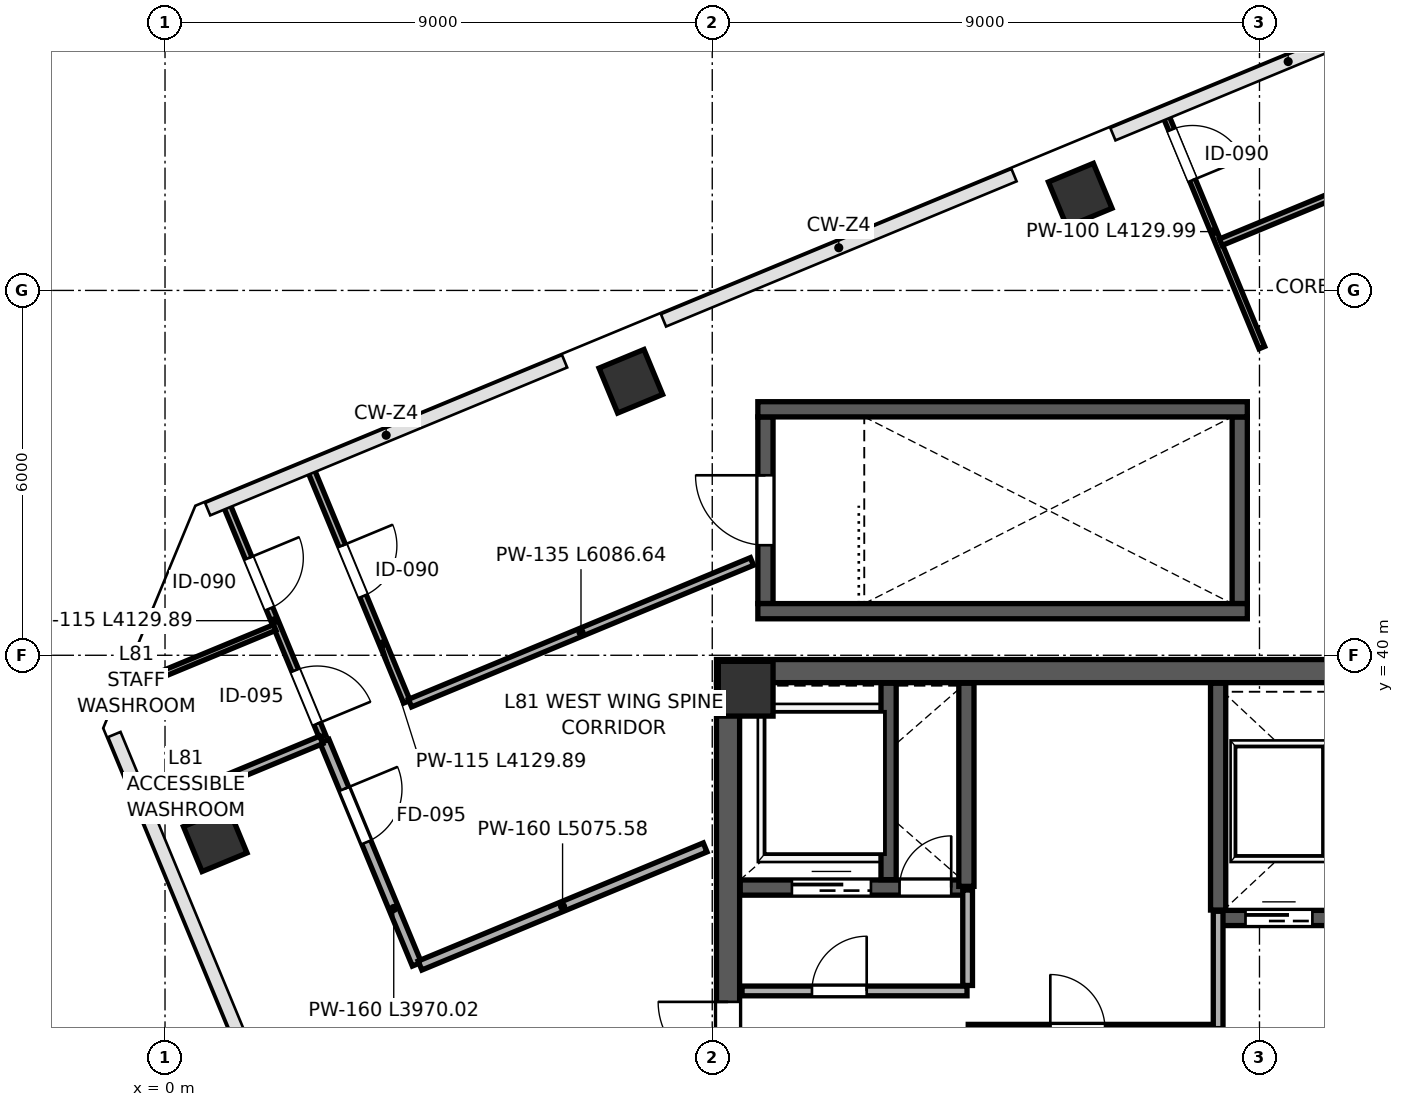
"""IFC4 building model, lengths in metres.
Left out: names, types, materials, properties, quantities, classifications, styles, units other than length and angle.
Written with IfcOpenShell. Run it as: python <this file> out.ifc"""

import sys

from ifc_helpers import new_model, si_unit, direction, frame, frame_2d, origin, origin_2d, place, context, subcontext, project, spatial, rectangle, extrude, source, transform, mapped, element, fill, save


model = new_model("IFC4")
c1 = context("Model", 3, precision=1e-05, world=origin(), true_north=direction((0.0, 1.0)))
c2 = subcontext(c1, "Body", "Model", "MODEL_VIEW")
j1 = project(units=[si_unit("LENGTHUNIT", "METRE"), si_unit("PLANEANGLEUNIT", "RADIAN")], contexts=[c1])
p1 = place(None, origin())
s1 = spatial("IfcSite", under=j1, at=p1, CompositionType="ELEMENT")
p2 = place(p1, origin())
s2 = spatial("IfcBuilding", under=s1, at=p2, CompositionType="ELEMENT")
p3 = place(p2, frame((0.0, 0.0, 360.0)))
s3 = spatial("IfcBuildingStorey", under=s2, at=p3, CompositionType="ELEMENT", Elevation=360.0)
m1 = source(origin(), c2, "Body", "SweptSolid", [
    extrude(rectangle(XDim=0.9, YDim=0.9, at=origin_2d()), origin(), (0.0, 0.0, 1.0), 5.999),
])
p4 = place(p3, frame((9.55, 39.45, 0.001), z_axis=(0.0, 0.0, 1.0), x_axis=(1.0, 0.0, 0.0)))
e1 = element("IfcColumn", 1, at=p4, inside=s3, PredefinedType="COLUMN", context=c2, shape_type="MappedRepresentation", body=[
    mapped(m1, transform((0.0, 0.0, 0.0), scale=1.0)),
])
m2 = source(origin(), c2, "Body", "SweptSolid", [
    extrude(rectangle(XDim=0.8, YDim=0.8, at=origin_2d()), origin(), (0.0, 0.0, 1.0), 5.699),
])
for number, where, z_axis, x_axis in (
    (2, (0.826, 36.966, 0.001), (0.0, 0.0, 1.0), (-0.383, 0.924, 0.0)),
    (3, (7.661, 44.506, 0.001), (0.0, 0.0, 1.0), (-0.383, 0.924, 0.0)),
    (4, (15.052, 47.567, 0.001), (0.0, 0.0, 1.0), (-0.383, 0.924, 0.0)),
):
    element("IfcColumn", number, at=place(p3, frame(where, z_axis=z_axis, x_axis=x_axis)), inside=s3, PredefinedType="COLUMN", context=c2, shape_type="MappedRepresentation", body=[
        mapped(m2, transform((0.0, 0.0, 0.0), scale=1.0)),
    ])
p5 = place(p3, frame((9.26, 24.45, 0.0), z_axis=(0.0, 0.0, 1.0), x_axis=(0.0, 1.0, 0.0)))
e5 = element("IfcWall", 5, at=p5, inside=s3, PredefinedType="SHEAR", context=c2, shape_type="SweptSolid", body=[
    extrude(rectangle(XDim=15.1, YDim=0.38, at=frame_2d((7.55, 0.0))), origin(), (0.0, 0.0, 1.0), 5.72),
])
p6 = place(p5, frame((8.7, 0.0, 0.0)))
e6 = element("IfcOpeningElement", 6, at=p6, cuts=e5, PredefinedType="OPENING", context=c2, shape_type="SweptSolid", body=[
    extrude(rectangle(XDim=1.15, YDim=2.2, at=frame_2d((0.575, 1.1))), frame((0.0, 0.2, 0.0), z_axis=(0.0, -1.0, 0.0), x_axis=(1.0, 0.0, 0.0)), (0.0, 0.0, 1.0), 0.4),
])
p7 = place(p3, frame((9.07, 39.74, 0.0), z_axis=(0.0, 0.0, 1.0), x_axis=(1.0, 0.0, 0.0)))
e7 = element("IfcWall", 7, at=p7, inside=s3, PredefinedType="SHEAR", context=c2, shape_type="SweptSolid", body=[
    extrude(rectangle(XDim=17.86, YDim=0.38, at=frame_2d((8.93, 0.0))), origin(), (0.0, 0.0, 1.0), 5.72),
])
p8 = place(p3, frame((9.46, 36.18, 0.0), z_axis=(0.0, 0.0, 1.0), x_axis=(1.0, 0.0, 0.0)))
e8 = element("IfcWall", 8, at=p8, inside=s3, PredefinedType="SHEAR", context=c2, shape_type="SweptSolid", body=[
    extrude(rectangle(XDim=3.79, YDim=0.25, at=frame_2d((1.895, 0.0))), origin(), (0.0, 0.0, 1.0), 5.72),
])
p9 = place(p8, frame((2.62, 0.0, 0.0)))
e9 = element("IfcOpeningElement", 9, at=p9, cuts=e8, PredefinedType="OPENING", context=c2, shape_type="SweptSolid", body=[
    extrude(rectangle(XDim=0.85, YDim=2.1, at=frame_2d((0.425, 1.05))), frame((0.0, 0.135, 0.0), z_axis=(0.0, -1.0, 0.0), x_axis=(1.0, 0.0, 0.0)), (0.0, 0.0, 1.0), 0.27),
])
p10 = place(p8, frame((0.85, 0.0, 0.0)))
e10 = element("IfcOpeningElement", 10, at=p10, cuts=e8, PredefinedType="OPENING", context=c2, shape_type="SweptSolid", body=[
    extrude(rectangle(XDim=1.3, YDim=2.25, at=frame_2d((0.65, 1.125))), frame((0.0, 0.135, 0.0), z_axis=(0.0, -1.0, 0.0), x_axis=(1.0, 0.0, 0.0)), (0.0, 0.0, 1.0), 0.27),
])
p11 = place(p3, frame((11.9, 36.31, 0.0), z_axis=(0.0, 0.0, 1.0), x_axis=(0.0, 1.0, 0.0)))
e11 = element("IfcWall", 11, at=p11, inside=s3, PredefinedType="SHEAR", context=c2, shape_type="SweptSolid", body=[
    extrude(rectangle(XDim=3.23, YDim=0.25, at=frame_2d((1.615, 0.0))), origin(), (0.0, 0.0, 1.0), 5.72),
])
p12 = place(p3, frame((13.18, 36.2, 0.0), z_axis=(0.0, 0.0, 1.0), x_axis=(0.0, 1.0, 0.0)))
e12 = element("IfcWall", 12, at=p12, inside=s3, PredefinedType="SHEAR", context=c2, shape_type="SweptSolid", body=[
    extrude(rectangle(XDim=3.34, YDim=0.25, at=frame_2d((1.67, 0.0))), origin(), (0.0, 0.0, 1.0), 5.72),
])
p13 = place(p3, frame((17.32, 35.68, 0.0), z_axis=(0.0, 0.0, 1.0), x_axis=(1.0, 0.0, 0.0)))
e13 = element("IfcWall", 13, at=p13, inside=s3, PredefinedType="SHEAR", context=c2, shape_type="SweptSolid", body=[
    extrude(rectangle(XDim=3.87, YDim=0.25, at=frame_2d((1.935, 0.0))), origin(), (0.0, 0.0, 1.0), 5.72),
])
p14 = place(p13, frame((0.45, 0.0, 0.0)))
e14 = element("IfcOpeningElement", 14, at=p14, cuts=e13, PredefinedType="OPENING", context=c2, shape_type="SweptSolid", body=[
    extrude(rectangle(XDim=1.1, YDim=2.2, at=frame_2d((0.55, 1.1))), frame((0.0, 0.135, 0.0), z_axis=(0.0, -1.0, 0.0), x_axis=(1.0, 0.0, 0.0)), (0.0, 0.0, 1.0), 0.27),
])
p15 = place(p13, frame((2.35, 0.0, 0.0)))
e15 = element("IfcOpeningElement", 15, at=p15, cuts=e13, PredefinedType="OPENING", context=c2, shape_type="SweptSolid", body=[
    extrude(rectangle(XDim=1.1, YDim=2.2, at=frame_2d((0.55, 1.1))), frame((0.0, 0.135, 0.0), z_axis=(0.0, -1.0, 0.0), x_axis=(1.0, 0.0, 0.0)), (0.0, 0.0, 1.0), 0.27),
])
p16 = place(p3, frame((17.32, 35.81, 0.0), z_axis=(0.0, 0.0, 1.0), x_axis=(0.0, 1.0, 0.0)))
e16 = element("IfcWall", 16, at=p16, inside=s3, PredefinedType="SHEAR", context=c2, shape_type="SweptSolid", body=[
    extrude(rectangle(XDim=3.73, YDim=0.25, at=frame_2d((1.865, 0.0))), origin(), (0.0, 0.0, 1.0), 5.72),
])
p17 = place(p3, frame((9.875, 40.85, 0.0), z_axis=(0.0, 0.0, 1.0), x_axis=(0.0, 1.0, 0.0)))
e17 = element("IfcWall", 17, at=p17, inside=s3, PredefinedType="SHEAR", context=c2, shape_type="SweptSolid", body=[
    extrude(rectangle(XDim=3.07, YDim=0.25, at=frame_2d((1.535, 0.0))), origin(), (0.0, 0.0, 1.0), 5.72),
])
p18 = place(p17, frame((0.96, 0.0, 0.0)))
e18 = element("IfcOpeningElement", 18, at=p18, cuts=e17, PredefinedType="OPENING", context=c2, shape_type="SweptSolid", body=[
    extrude(rectangle(XDim=1.15, YDim=2.2, at=frame_2d((0.575, 1.1))), frame((0.0, 0.135, 0.0), z_axis=(0.0, -1.0, 0.0), x_axis=(1.0, 0.0, 0.0)), (0.0, 0.0, 1.0), 0.27),
])
p19 = place(p3, frame((17.675, 40.85, 0.0), z_axis=(0.0, 0.0, 1.0), x_axis=(0.0, 1.0, 0.0)))
e19 = element("IfcWall", 19, at=p19, inside=s3, PredefinedType="SHEAR", context=c2, shape_type="SweptSolid", body=[
    extrude(rectangle(XDim=3.07, YDim=0.25, at=frame_2d((1.535, 0.0))), origin(), (0.0, 0.0, 1.0), 5.72),
])
for number, where, z_axis, x_axis in (
    (20, (9.75, 40.725, 0.0), (0.0, 0.0, 1.0), (1.0, 0.0, 0.0)),
    (21, (9.75, 44.045, 0.0), (0.0, 0.0, 1.0), (1.0, 0.0, 0.0)),
):
    element("IfcWall", number, at=place(p3, frame(where, z_axis=z_axis, x_axis=x_axis)), inside=s3, PredefinedType="SHEAR", context=c2, shape_type="SweptSolid", body=[
        extrude(rectangle(XDim=8.05, YDim=0.25, at=frame_2d((4.025, 0.0))), origin(), (0.0, 0.0, 1.0), 5.72),
    ])
p20 = place(p3, frame((9.49, 34.48, 0.0), z_axis=(0.0, 0.0, 1.0), x_axis=(1.0, 0.0, 0.0)))
e22 = element("IfcWall", 22, at=p20, inside=s3, PredefinedType="PARTITIONING", context=c2, shape_type="SweptSolid", body=[
    extrude(rectangle(XDim=3.7, YDim=0.16, at=frame_2d((1.85, 0.0))), origin(), (0.0, 0.0, 1.0), 5.72),
])
p21 = place(p20, frame((1.15, 0.0, 0.0)))
e23 = element("IfcOpeningElement", 23, at=p21, cuts=e22, PredefinedType="OPENING", context=c2, shape_type="SweptSolid", body=[
    extrude(rectangle(XDim=0.9, YDim=2.15, at=frame_2d((0.45, 1.075))), frame((0.0, 0.09, 0.0), z_axis=(0.0, -1.0, 0.0), x_axis=(1.0, 0.0, 0.0)), (0.0, 0.0, 1.0), 0.18),
])
p22 = place(p3, frame((13.2, 34.57, 0.0), z_axis=(0.0, 0.0, 1.0), x_axis=(0.0, 1.0, 0.0)))
e24 = element("IfcWall", 24, at=p22, inside=s3, PredefinedType="PARTITIONING", context=c2, shape_type="SweptSolid", body=[
    extrude(rectangle(XDim=1.57, YDim=0.16, at=frame_2d((0.785, 0.0))), origin(), (0.0, 0.0, 1.0), 5.72),
])
p23 = place(p3, frame((13.21, 33.85, 0.0), z_axis=(0.0, 0.0, 1.0), x_axis=(1.0, 0.0, 0.0)))
e25 = element("IfcWall", 25, at=p23, inside=s3, PredefinedType="PARTITIONING", context=c2, shape_type="SweptSolid", body=[
    extrude(rectangle(XDim=4.1, YDim=0.16, at=frame_2d((2.05, 0.0))), origin(), (0.0, 0.0, 1.0), 5.72),
])
p24 = place(p23, frame((1.35, 0.0, 0.0)))
e26 = element("IfcOpeningElement", 26, at=p24, cuts=e25, PredefinedType="OPENING", context=c2, shape_type="SweptSolid", body=[
    extrude(rectangle(XDim=0.9, YDim=2.15, at=frame_2d((0.45, 1.075))), frame((0.0, 0.09, 0.0), z_axis=(0.0, -1.0, 0.0), x_axis=(1.0, 0.0, 0.0)), (0.0, 0.0, 1.0), 0.18),
])
p25 = place(p3, frame((17.32, 33.86, 0.0), z_axis=(0.0, 0.0, 1.0), x_axis=(0.0, 1.0, 0.0)))
e27 = element("IfcWall", 27, at=p25, inside=s3, PredefinedType="PARTITIONING", context=c2, shape_type="SweptSolid", body=[
    extrude(rectangle(XDim=1.93, YDim=0.16, at=frame_2d((0.965, 0.0))), origin(), (0.0, 0.0, 1.0), 5.72),
])
p26 = place(p3, frame((1.011, 42.477, 0.0), z_axis=(0.0, 0.0, 1.0), x_axis=(0.382696360839, -0.923874177256, 0.0)))
e28 = element("IfcWall", 28, at=p26, inside=s3, PredefinedType="PARTITIONING", context=c2, shape_type="SweptSolid", body=[
    extrude(rectangle(XDim=4.13, YDim=0.115, at=frame_2d((2.065, 0.0))), origin(), (0.0, 0.0, 1.0), 5.72),
])
p27 = place(p26, frame((0.95, 0.0, 0.0)))
e29 = element("IfcOpeningElement", 29, at=p27, cuts=e28, PredefinedType="OPENING", context=c2, shape_type="SweptSolid", body=[
    extrude(rectangle(XDim=0.9, YDim=2.15, at=frame_2d((0.45, 1.075))), frame((0.0, 0.067, 0.0), z_axis=(0.0, -1.0, 0.0), x_axis=(1.0, 0.0, 0.0)), (0.0, 0.0, 1.0), 0.135),
])
p28 = place(p26, frame((2.95, 0.0, 0.0)))
e30 = element("IfcOpeningElement", 30, at=p28, cuts=e28, PredefinedType="OPENING", context=c2, shape_type="SweptSolid", body=[
    extrude(rectangle(XDim=0.95, YDim=2.15, at=frame_2d((0.475, 1.075))), frame((0.0, 0.067, 0.0), z_axis=(0.0, -1.0, 0.0), x_axis=(1.0, 0.0, 0.0)), (0.0, 0.0, 1.0), 0.135),
])
p29 = place(p3, frame((-0.553, 39.48, 0.0), z_axis=(0.0, 0.0, 1.0), x_axis=(0.923867562545, 0.382712329141, 0.0)))
e31 = element("IfcWall", 31, at=p29, inside=s3, PredefinedType="PARTITIONING", context=c2, shape_type="SweptSolid", body=[
    extrude(rectangle(XDim=2.552, YDim=0.1, at=frame_2d((1.276, 0.0))), origin(), (0.0, 0.0, 1.0), 5.72),
])
p30 = place(p3, frame((2.622, 38.587, 0.0), z_axis=(0.0, 0.0, 1.0), x_axis=(0.382697586706, -0.923873669464, 0.0)))
e32 = element("IfcWall", 32, at=p30, inside=s3, PredefinedType="PARTITIONING", context=c2, shape_type="SweptSolid", body=[
    extrude(rectangle(XDim=3.97, YDim=0.16, at=frame_2d((1.985, 0.0))), origin(), (0.0, 0.0, 1.0), 5.72),
])
p31 = place(p30, frame((0.85, 0.0, 0.0)))
e33 = element("IfcOpeningElement", 33, at=p31, cuts=e32, PredefinedType="OPENING", context=c2, shape_type="SweptSolid", body=[
    extrude(rectangle(XDim=0.95, YDim=2.15, at=frame_2d((0.475, 1.075))), frame((0.0, 0.09, 0.0), z_axis=(0.0, -1.0, 0.0), x_axis=(1.0, 0.0, 0.0)), (0.0, 0.0, 1.0), 0.18),
])
p32 = place(p3, frame((4.194, 34.898, 0.0), z_axis=(0.0, 0.0, 1.0), x_axis=(0.923876129391, 0.38269164812, 0.0)))
e34 = element("IfcWall", 34, at=p32, inside=s3, PredefinedType="PARTITIONING", context=c2, shape_type="SweptSolid", body=[
    extrude(rectangle(XDim=5.076, YDim=0.16, at=frame_2d((2.538, 0.0))), origin(), (0.0, 0.0, 1.0), 5.72),
])
p33 = place(p3, frame((-0.257, 37.438, 0.0), z_axis=(0.0, 0.0, 1.0), x_axis=(0.923856366642, 0.382739354934, 0.0)))
e35 = element("IfcWall", 35, at=p33, inside=s3, PredefinedType="PARTITIONING", context=c2, shape_type="SweptSolid", body=[
    extrude(rectangle(XDim=3.06, YDim=0.135, at=frame_2d((1.53, 0.0))), origin(), (0.0, 0.0, 1.0), 5.72),
])
p34 = place(p3, frame((2.397, 43.051, 0.0), z_axis=(0.0, 0.0, 1.0), x_axis=(0.382645903769, -0.923895076472, 0.0)))
e36 = element("IfcWall", 36, at=p34, inside=s3, PredefinedType="PARTITIONING", context=c2, shape_type="SweptSolid", body=[
    extrude(rectangle(XDim=4.13, YDim=0.115, at=frame_2d((2.065, 0.0))), origin(), (0.0, 0.0, 1.0), 5.72),
])
p35 = place(p34, frame((1.35, 0.0, 0.0)))
e37 = element("IfcOpeningElement", 37, at=p35, cuts=e36, PredefinedType="OPENING", context=c2, shape_type="SweptSolid", body=[
    extrude(rectangle(XDim=0.9, YDim=2.15, at=frame_2d((0.45, 1.075))), frame((0.0, 0.067, 0.0), z_axis=(0.0, -1.0, 0.0), x_axis=(1.0, 0.0, 0.0)), (0.0, 0.0, 1.0), 0.135),
])
p36 = place(p3, frame((16.458, 48.875, 0.0), z_axis=(0.0, 0.0, 1.0), x_axis=(0.382645903769, -0.923895076472, 0.0)))
e38 = element("IfcWall", 38, at=p36, inside=s3, PredefinedType="PARTITIONING", context=c2, shape_type="SweptSolid", body=[
    extrude(rectangle(XDim=4.13, YDim=0.1, at=frame_2d((2.065, 0.0))), origin(), (0.0, 0.0, 1.0), 5.055),
])
p37 = place(p36, frame((0.25, 0.0, 0.0)))
e39 = element("IfcOpeningElement", 39, at=p37, cuts=e38, PredefinedType="OPENING", context=c2, shape_type="SweptSolid", body=[
    extrude(rectangle(XDim=0.9, YDim=2.15, at=frame_2d((0.45, 1.075))), frame((0.0, 0.06, 0.0), z_axis=(0.0, -1.0, 0.0), x_axis=(1.0, 0.0, 0.0)), (0.0, 0.0, 1.0), 0.12),
])
p38 = place(p3, frame((4.03, 39.213, 0.0), z_axis=(0.0, 0.0, 1.0), x_axis=(0.923873590168, 0.382697778135, 0.0)))
e40 = element("IfcWall", 40, at=p38, inside=s3, PredefinedType="PARTITIONING", context=c2, shape_type="SweptSolid", body=[
    extrude(rectangle(XDim=6.087, YDim=0.135, at=frame_2d((3.043, 0.0))), origin(), (0.0, 0.0, 1.0), 5.72),
])
p39 = place(p3, frame((17.364, 46.793, 0.0), z_axis=(0.0, 0.0, 1.0), x_axis=(0.923874230192, 0.382696233045, 0.0)))
e41 = element("IfcWall", 41, at=p39, inside=s3, PredefinedType="PARTITIONING", context=c2, shape_type="SweptSolid", body=[
    extrude(rectangle(XDim=13.772, YDim=0.115, at=frame_2d((6.886, 0.0))), origin(), (0.0, 0.0, 1.0), 5.72),
])
m3 = source(origin(), c2, "Body", "SweptSolid", [
    extrude(rectangle(XDim=1.15, YDim=2.2, at=frame_2d((0.575, 1.1))), frame((0.0, 0.025, 0.0), z_axis=(0.0, -1.0, 0.0), x_axis=(1.0, 0.0, 0.0)), (0.0, 0.0, 1.0), 0.05),
])
p40 = place(p6, origin())
e42 = element("IfcDoor", 42, at=p40, inside=s3, OperationType="SINGLE_SWING_RIGHT", PredefinedType="DOOR", context=c2, shape_type="MappedRepresentation", body=[
    mapped(m3, transform((0.0, 0.0, 0.0), scale=1.0)),
])
fill(e6, e42)
p41 = place(p18, origin())
e43 = element("IfcDoor", 43, at=p41, inside=s3, OperationType="SINGLE_SWING_RIGHT", PredefinedType="DOOR", context=c2, shape_type="MappedRepresentation", body=[
    mapped(m3, transform((0.0, 0.0, 0.0), scale=1.0)),
])
fill(e18, e43)
m4 = source(origin(), c2, "Body", "SweptSolid", [
    extrude(rectangle(XDim=0.85, YDim=2.1, at=frame_2d((0.425, 1.05))), frame((0.0, 0.025, 0.0), z_axis=(0.0, -1.0, 0.0), x_axis=(1.0, 0.0, 0.0)), (0.0, 0.0, 1.0), 0.05),
])
p42 = place(p9, origin())
e44 = element("IfcDoor", 44, at=p42, inside=s3, OperationType="SINGLE_SWING_RIGHT", PredefinedType="DOOR", context=c2, shape_type="MappedRepresentation", body=[
    mapped(m4, transform((0.0, 0.0, 0.0), scale=1.0)),
])
fill(e9, e44)
m5 = source(origin(), c2, "Body", "SweptSolid", [
    extrude(rectangle(XDim=1.1, YDim=2.2, at=frame_2d((0.55, 1.1))), frame((0.0, 0.025, 0.0), z_axis=(0.0, -1.0, 0.0), x_axis=(1.0, 0.0, 0.0)), (0.0, 0.0, 1.0), 0.05),
])
p43 = place(p14, origin())
e45 = element("IfcDoor", 45, at=p43, inside=s3, OperationType="SLIDING_TO_LEFT", PredefinedType="DOOR", context=c2, shape_type="MappedRepresentation", body=[
    mapped(m5, transform((0.0, 0.0, 0.0), scale=1.0)),
])
fill(e14, e45)
m6 = source(origin(), c2, "Body", "SweptSolid", [
    extrude(rectangle(XDim=1.3, YDim=2.25, at=frame_2d((0.65, 1.125))), frame((0.0, 0.025, 0.0), z_axis=(0.0, -1.0, 0.0), x_axis=(1.0, 0.0, 0.0)), (0.0, 0.0, 1.0), 0.05),
])
p44 = place(p10, origin())
e46 = element("IfcDoor", 46, at=p44, inside=s3, OperationType="SLIDING_TO_LEFT", PredefinedType="DOOR", context=c2, shape_type="MappedRepresentation", body=[
    mapped(m6, transform((0.0, 0.0, 0.0), scale=1.0)),
])
fill(e10, e46)
m7 = source(origin(), c2, "Body", "SweptSolid", [
    extrude(rectangle(XDim=0.9, YDim=2.15, at=frame_2d((0.45, 1.075))), frame((0.0, 0.025, 0.0), z_axis=(0.0, -1.0, 0.0), x_axis=(1.0, 0.0, 0.0)), (0.0, 0.0, 1.0), 0.05),
])
p45 = place(p21, origin())
e47 = element("IfcDoor", 47, at=p45, inside=s3, OperationType="SINGLE_SWING_RIGHT", PredefinedType="DOOR", context=c2, shape_type="MappedRepresentation", body=[
    mapped(m7, transform((0.0, 0.0, 0.0), scale=1.0)),
])
fill(e23, e47)
m8 = source(origin(), c2, "Body", "SweptSolid", [
    extrude(rectangle(XDim=0.9, YDim=2.15, at=frame_2d((0.45, 1.075))), frame((0.0, 0.025, 0.0), z_axis=(0.0, -1.0, 0.0), x_axis=(1.0, 0.0, 0.0)), (0.0, 0.0, 1.0), 0.05),
])
p46 = place(p27, origin())
e48 = element("IfcDoor", 48, at=p46, inside=s3, OperationType="SINGLE_SWING_LEFT", PredefinedType="DOOR", context=c2, shape_type="MappedRepresentation", body=[
    mapped(m8, transform((0.0, 0.0, 0.0), scale=1.0)),
])
fill(e29, e48)
m9 = source(origin(), c2, "Body", "SweptSolid", [
    extrude(rectangle(XDim=0.95, YDim=2.15, at=frame_2d((0.475, 1.075))), frame((0.0, 0.025, 0.0), z_axis=(0.0, -1.0, 0.0), x_axis=(1.0, 0.0, 0.0)), (0.0, 0.0, 1.0), 0.05),
])
p47 = place(p28, origin())
e49 = element("IfcDoor", 49, at=p47, inside=s3, OperationType="SINGLE_SWING_RIGHT", PredefinedType="DOOR", context=c2, shape_type="MappedRepresentation", body=[
    mapped(m9, transform((0.0, 0.0, 0.0), scale=1.0)),
])
fill(e30, e49)
m10 = source(origin(), c2, "Body", "SweptSolid", [
    extrude(rectangle(XDim=0.95, YDim=2.15, at=frame_2d((0.475, 1.075))), frame((0.0, 0.025, 0.0), z_axis=(0.0, -1.0, 0.0), x_axis=(1.0, 0.0, 0.0)), (0.0, 0.0, 1.0), 0.05),
])
p48 = place(p31, origin())
e50 = element("IfcDoor", 50, at=p48, inside=s3, OperationType="SINGLE_SWING_LEFT", PredefinedType="DOOR", context=c2, shape_type="MappedRepresentation", body=[
    mapped(m10, transform((0.0, 0.0, 0.0), scale=1.0)),
])
fill(e33, e50)
p49 = place(p35, origin())
e51 = element("IfcDoor", 51, at=p49, inside=s3, OperationType="SINGLE_SWING_LEFT", PredefinedType="DOOR", context=c2, shape_type="MappedRepresentation", body=[
    mapped(m8, transform((0.0, 0.0, 0.0), scale=1.0)),
])
fill(e37, e51)
p50 = place(p37, origin())
e52 = element("IfcDoor", 52, at=p50, inside=s3, OperationType="SINGLE_SWING_RIGHT", PredefinedType="DOOR", context=c2, shape_type="MappedRepresentation", body=[
    mapped(m8, transform((0.0, 0.0, 0.0), scale=1.0)),
])
fill(e39, e52)
save(model, sys.argv[1])
